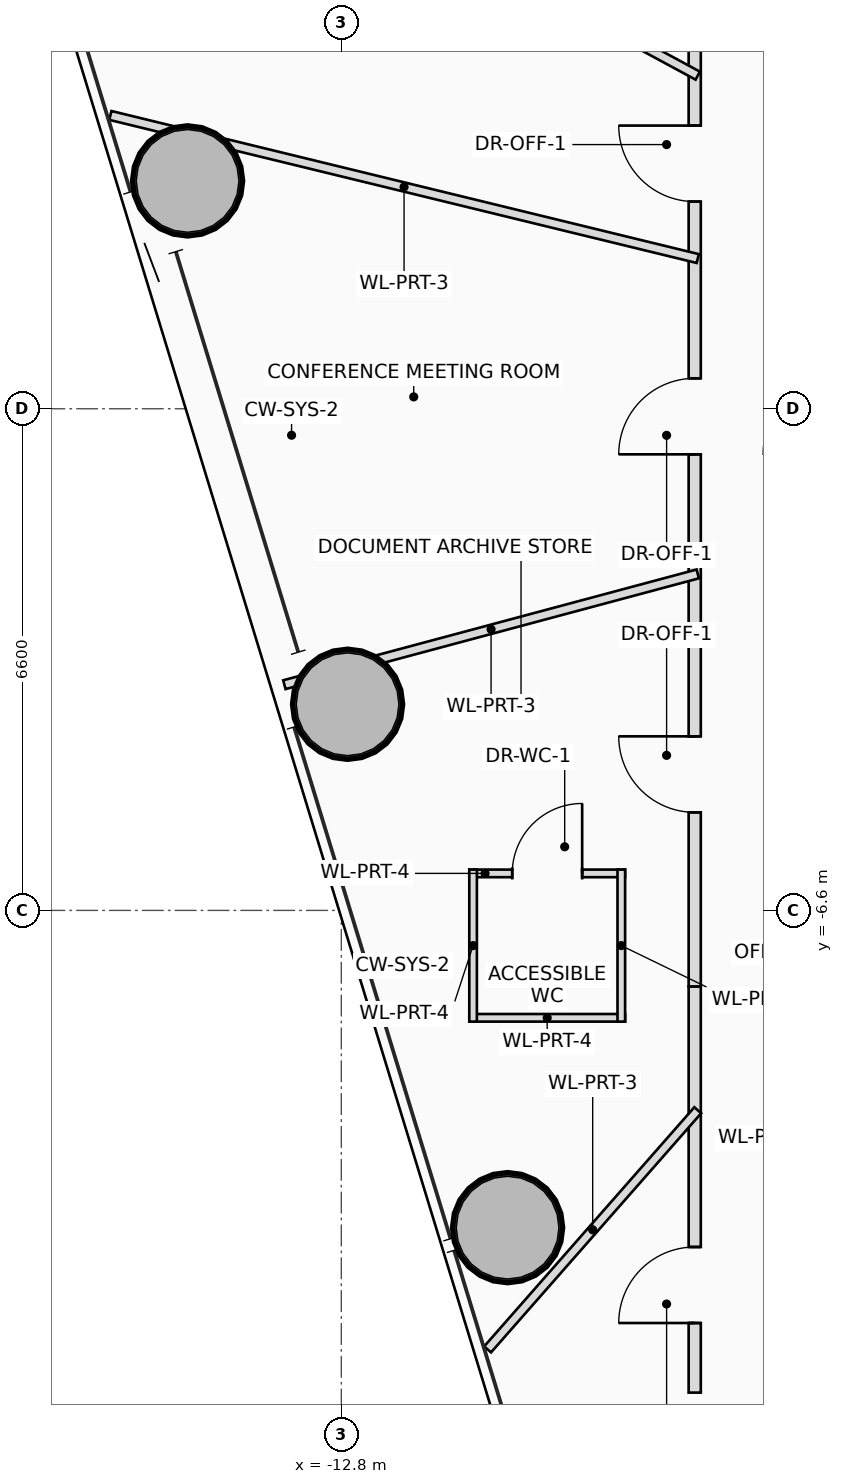
"""IFC4 building model, lengths in metres.
Left out: names, types, materials, properties, quantities, classifications, styles, units other than length and angle.
Written with IfcOpenShell. Run it as: python <this file> out.ifc"""

import sys

from ifc_helpers import new_model, si_unit, direction, frame, frame_2d, origin, origin_2d, place, context, subcontext, project, spatial, rectangle, hollow_circle, extrude, source, transform, mapped, element, fill, save


model = new_model("IFC4")
c1 = context("Model", 3, precision=1e-05, world=origin(), true_north=direction((0.0, 1.0)))
c2 = subcontext(c1, "Body", "Model", "MODEL_VIEW")
j1 = project(units=[si_unit("LENGTHUNIT", "METRE"), si_unit("PLANEANGLEUNIT", "RADIAN")], contexts=[c1])
p1 = place(None, origin())
s1 = spatial("IfcSite", under=j1, at=p1, CompositionType="ELEMENT")
p2 = place(p1, origin())
s2 = spatial("IfcBuilding", under=s1, at=p2, CompositionType="ELEMENT")
p3 = place(p2, frame((0.0, 0.0, 116.15)))
s3 = spatial("IfcBuildingStorey", under=s2, at=p3, CompositionType="ELEMENT", Elevation=116.15)
m1 = source(origin(), c2, "Body", "SweptSolid", [
    extrude(hollow_circle(Radius=0.725, WallThickness=0.05, at=origin_2d()), origin(), (0.0, 0.0, 1.0), 3.75),
])
for number, where, z_axis, x_axis in (
    (1, (-14.823, 2.998, 0.0), (0.0, 0.0, 1.0), (1.0, 0.0, 0.0)),
    (2, (-12.717, -3.888, 0.0), (0.0, 0.0, 1.0), (1.0, 0.0, 0.0)),
    (3, (-10.612, -10.774, 0.0), (0.0, 0.0, 1.0), (1.0, 0.0, 0.0)),
):
    element("IfcColumn", number, at=place(p3, frame(where, z_axis=z_axis, x_axis=x_axis)), inside=s3, PredefinedType="COLUMN", context=c2, shape_type="MappedRepresentation", body=[
        mapped(m1, transform((0.0, 0.0, 0.0), scale=1.0)),
    ])
p4 = place(p3, frame((-11.116, -6.113, 0.0), z_axis=(0.0, 0.0, 1.0), x_axis=(1.0, 0.0, 0.0)))
e4 = element("IfcWall", 4, at=p4, inside=s3, PredefinedType="PARTITIONING", context=c2, shape_type="SweptSolid", body=[
    extrude(rectangle(XDim=2.05, YDim=0.1, at=frame_2d((1.025, 0.0))), origin(), (0.0, 0.0, 1.0), 3.165),
])
p5 = place(p4, frame((0.565, 0.0, 0.0)))
e5 = element("IfcOpeningElement", 5, at=p5, cuts=e4, PredefinedType="OPENING", context=c2, shape_type="SweptSolid", body=[
    extrude(rectangle(XDim=0.92, YDim=2.1, at=frame_2d((0.46, 1.05))), frame((0.0, 0.06, 0.0), z_axis=(0.0, -1.0, 0.0), x_axis=(1.0, 0.0, 0.0)), (0.0, 0.0, 1.0), 0.12),
])
p6 = place(p3, frame((-9.066, -8.013, 0.0), z_axis=(0.0, 0.0, 1.0), x_axis=(-1.0, 0.0, 0.0)))
e6 = element("IfcWall", 6, at=p6, inside=s3, PredefinedType="PARTITIONING", context=c2, shape_type="SweptSolid", body=[
    extrude(rectangle(XDim=2.05, YDim=0.1, at=frame_2d((1.025, 0.0))), origin(), (0.0, 0.0, 1.0), 3.165),
])
p7 = place(p3, frame((-9.116, -6.063, 0.0), z_axis=(0.0, 0.0, 1.0), x_axis=(0.0, -1.0, 0.0)))
e7 = element("IfcWall", 7, at=p7, inside=s3, PredefinedType="PARTITIONING", context=c2, shape_type="SweptSolid", body=[
    extrude(rectangle(XDim=2.0, YDim=0.1, at=frame_2d((1.0, 0.0))), origin(), (0.0, 0.0, 1.0), 3.015),
])
p8 = place(p3, frame((-11.066, -8.063, 0.0), z_axis=(0.0, 0.0, 1.0), x_axis=(0.0, 1.0, 0.0)))
e8 = element("IfcWall", 8, at=p8, inside=s3, PredefinedType="PARTITIONING", context=c2, shape_type="SweptSolid", body=[
    extrude(rectangle(XDim=2.0, YDim=0.1, at=frame_2d((1.0, 0.0))), origin(), (0.0, 0.0, 1.0), 3.51),
])
p9 = place(p3, frame((-8.15, -12.944, 0.0), z_axis=(0.0, 0.0, 1.0), x_axis=(0.0, 1.0, 0.0)))
e9 = element("IfcWall", 9, at=p9, inside=s3, PredefinedType="PARTITIONING", context=c2, shape_type="SweptSolid", body=[
    extrude(rectangle(XDim=5.344, YDim=0.16, at=frame_2d((2.672, 0.0))), origin(), (0.0, 0.0, 1.0), 2.815),
])
p10 = place(p9, frame((0.916, 0.0, 0.0)))
e10 = element("IfcOpeningElement", 10, at=p10, cuts=e9, PredefinedType="OPENING", context=c2, shape_type="SweptSolid", body=[
    extrude(rectangle(XDim=1.0, YDim=2.25, at=frame_2d((0.5, 1.125))), frame((0.0, 0.09, 0.0), z_axis=(0.0, -1.0, 0.0), x_axis=(1.0, 0.0, 0.0)), (0.0, 0.0, 1.0), 0.18),
])
p11 = place(p3, frame((-8.15, -7.6, 0.0), z_axis=(0.0, 0.0, 1.0), x_axis=(0.0, 1.0, 0.0)))
e11 = element("IfcWall", 11, at=p11, inside=s3, PredefinedType="PARTITIONING", context=c2, shape_type="SweptSolid", body=[
    extrude(rectangle(XDim=15.2, YDim=0.16, at=frame_2d((7.6, 0.0))), origin(), (0.0, 0.0, 1.0), 2.815),
])
p12 = place(p11, frame((2.29, 0.0, 0.0)))
e12 = element("IfcOpeningElement", 12, at=p12, cuts=e11, PredefinedType="OPENING", context=c2, shape_type="SweptSolid", body=[
    extrude(rectangle(XDim=1.0, YDim=2.25, at=frame_2d((0.5, 1.125))), frame((0.0, 0.09, 0.0), z_axis=(0.0, -1.0, 0.0), x_axis=(1.0, 0.0, 0.0)), (0.0, 0.0, 1.0), 0.18),
])
p13 = place(p11, frame((7.0, 0.0, 0.0)))
e13 = element("IfcOpeningElement", 13, at=p13, cuts=e11, PredefinedType="OPENING", context=c2, shape_type="SweptSolid", body=[
    extrude(rectangle(XDim=1.0, YDim=2.25, at=frame_2d((0.5, 1.125))), frame((0.0, 0.09, 0.0), z_axis=(0.0, -1.0, 0.0), x_axis=(1.0, 0.0, 0.0)), (0.0, 0.0, 1.0), 0.18),
])
p14 = place(p11, frame((10.325, 0.0, 0.0)))
e14 = element("IfcOpeningElement", 14, at=p14, cuts=e11, PredefinedType="OPENING", context=c2, shape_type="SweptSolid", body=[
    extrude(rectangle(XDim=1.0, YDim=2.25, at=frame_2d((0.5, 1.125))), frame((0.0, 0.09, 0.0), z_axis=(0.0, -1.0, 0.0), x_axis=(1.0, 0.0, 0.0)), (0.0, 0.0, 1.0), 0.18),
])
p15 = place(p11, frame((13.035, 0.0, 0.0)))
e15 = element("IfcOpeningElement", 15, at=p15, cuts=e11, PredefinedType="OPENING", context=c2, shape_type="SweptSolid", body=[
    extrude(rectangle(XDim=1.0, YDim=2.25, at=frame_2d((0.5, 1.125))), frame((0.0, 0.09, 0.0), z_axis=(0.0, -1.0, 0.0), x_axis=(1.0, 0.0, 0.0)), (0.0, 0.0, 1.0), 0.18),
])
p16 = place(p3, frame((-8.11, -2.173, 0.0), z_axis=(0.0, 0.0, 1.0), x_axis=(-0.965926955368, -0.258814831287, 0.0)))
e16 = element("IfcWall", 16, at=p16, inside=s3, PredefinedType="PARTITIONING", context=c2, shape_type="SweptSolid", body=[
    extrude(rectangle(XDim=5.631, YDim=0.12, at=frame_2d((2.815, 0.0))), origin(), (0.0, 0.0, 1.0), 3.015),
])
p17 = place(p3, frame((-8.11, -9.229, 0.0), z_axis=(0.0, 0.0, 1.0), x_axis=(-0.66009168755, -0.751185039805, 0.0)))
e17 = element("IfcWall", 17, at=p17, inside=s3, PredefinedType="PARTITIONING", context=c2, shape_type="SweptSolid", body=[
    extrude(rectangle(XDim=4.189, YDim=0.12, at=frame_2d((2.094, 0.0))), origin(), (0.0, 0.0, 1.0), 2.975),
])
p18 = place(p3, frame((-8.11, 4.382, 0.0), z_axis=(0.0, 0.0, 1.0), x_axis=(-0.879765097161, 0.47540863877, 0.0)))
e18 = element("IfcWall", 18, at=p18, inside=s3, PredefinedType="PARTITIONING", context=c2, shape_type="SweptSolid", body=[
    extrude(rectangle(XDim=10.741, YDim=0.12, at=frame_2d((5.371, 0.0))), origin(), (0.0, 0.0, 1.0), 2.815),
])
p19 = place(p3, frame((-8.11, 1.976, 0.0), z_axis=(0.0, 0.0, 1.0), x_axis=(-0.971576662732, 0.236725132665, 0.0)))
e19 = element("IfcWall", 19, at=p19, inside=s3, PredefinedType="PARTITIONING", context=c2, shape_type="SweptSolid", body=[
    extrude(rectangle(XDim=7.955, YDim=0.12, at=frame_2d((3.977, 0.0))), origin(), (0.0, 0.0, 1.0), 2.815),
])
p20 = place(p5, origin())
e20 = element("IfcDoor", 20, at=p20, inside=s3, OperationType="SINGLE_SWING_RIGHT", PredefinedType="DOOR", context=c2, shape_type="SweptSolid", body=[
    extrude(rectangle(XDim=0.92, YDim=2.1, at=frame_2d((0.46, 1.05))), frame((0.0, 0.025, 0.0), z_axis=(0.0, -1.0, 0.0), x_axis=(1.0, 0.0, 0.0)), (0.0, 0.0, 1.0), 0.05),
])
fill(e5, e20)
p21 = place(p10, origin())
e21 = element("IfcDoor", 21, at=p21, inside=s3, OperationType="SINGLE_SWING_LEFT", PredefinedType="DOOR", context=c2, shape_type="SweptSolid", body=[
    extrude(rectangle(XDim=1.0, YDim=2.25, at=frame_2d((0.5, 1.125))), frame((0.0, 0.025, 0.0), z_axis=(0.0, -1.0, 0.0), x_axis=(1.0, 0.0, 0.0)), (0.0, 0.0, 1.0), 0.05),
])
fill(e10, e21)
p22 = place(p12, origin())
e22 = element("IfcDoor", 22, at=p22, inside=s3, OperationType="SINGLE_SWING_RIGHT", PredefinedType="DOOR", context=c2, shape_type="SweptSolid", body=[
    extrude(rectangle(XDim=1.0, YDim=2.25, at=frame_2d((0.5, 1.125))), frame((0.0, 0.025, 0.0), z_axis=(0.0, -1.0, 0.0), x_axis=(1.0, 0.0, 0.0)), (0.0, 0.0, 1.0), 0.05),
])
fill(e12, e22)
p23 = place(p13, origin())
e23 = element("IfcDoor", 23, at=p23, inside=s3, OperationType="SINGLE_SWING_LEFT", PredefinedType="DOOR", context=c2, shape_type="SweptSolid", body=[
    extrude(rectangle(XDim=1.0, YDim=2.25, at=frame_2d((0.5, 1.125))), frame((0.0, 0.025, 0.0), z_axis=(0.0, -1.0, 0.0), x_axis=(1.0, 0.0, 0.0)), (0.0, 0.0, 1.0), 0.05),
])
fill(e13, e23)
p24 = place(p14, origin())
e24 = element("IfcDoor", 24, at=p24, inside=s3, OperationType="SINGLE_SWING_RIGHT", PredefinedType="DOOR", context=c2, shape_type="SweptSolid", body=[
    extrude(rectangle(XDim=1.0, YDim=2.25, at=frame_2d((0.5, 1.125))), frame((0.0, 0.025, 0.0), z_axis=(0.0, -1.0, 0.0), x_axis=(1.0, 0.0, 0.0)), (0.0, 0.0, 1.0), 0.05),
])
fill(e14, e24)
save(model, sys.argv[1])
